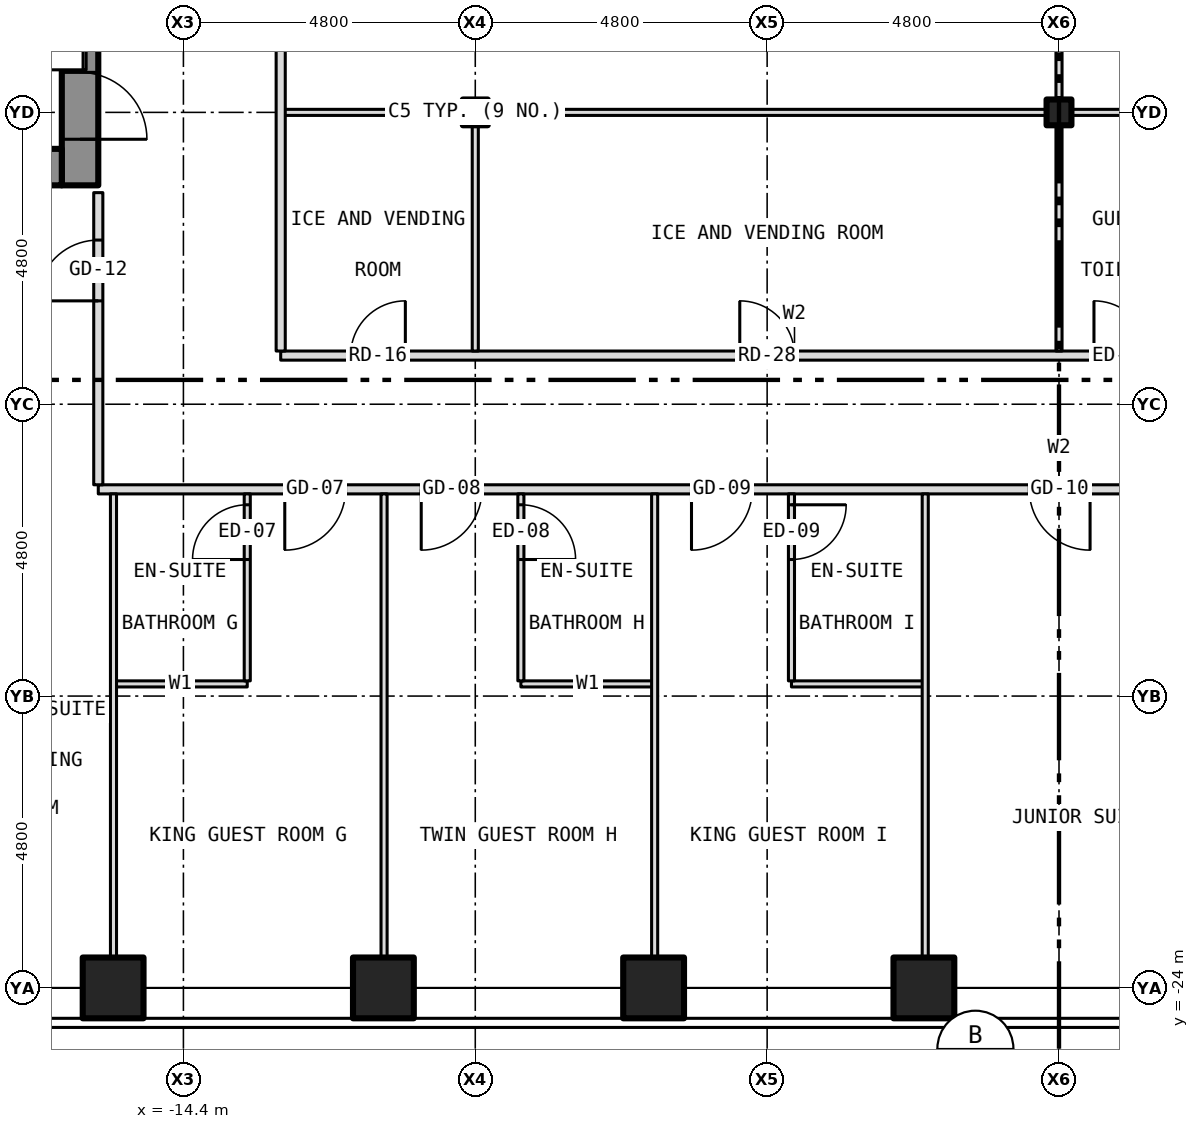
"""IFC4 building model, lengths in metres.
Left out: names, types, materials, properties, quantities, classifications, styles, units other than length and angle.
Written with IfcOpenShell. Run it as: python <this file> out.ifc"""

import sys

from ifc_helpers import new_model, si_unit, direction, frame, frame_2d, origin, origin_2d, place, context, subcontext, project, spatial, rectangle, hollow_rectangle, i_section, extrude, element, fill, save


model = new_model("IFC4")
c1 = context("Model", 3, precision=1e-05, world=origin(), true_north=direction((0.0, 1.0)))
c2 = subcontext(c1, "Body", "Model", "MODEL_VIEW")
j1 = project(units=[si_unit("LENGTHUNIT", "METRE"), si_unit("PLANEANGLEUNIT", "RADIAN")], contexts=[c1])
p1 = place(None, origin())
s1 = spatial("IfcSite", under=j1, at=p1, CompositionType="ELEMENT")
p2 = place(p1, origin())
s2 = spatial("IfcBuilding", under=s1, at=p2, CompositionType="ELEMENT")
p3 = place(p2, frame((0.0, 0.0, 49.5)))
s3 = spatial("IfcBuildingStorey", under=s2, at=p3, CompositionType="ELEMENT", Elevation=49.5)
for number, where, z_axis, x_axis in (
    (1, (-15.556, -24.0, -0.15), (0.0, 0.0, 1.0), (1.0, 0.0, 0.0)),
    (2, (-11.111, -24.0, -0.15), (0.0, 0.0, 1.0), (1.0, 0.0, 0.0)),
    (3, (-6.667, -24.0, -0.15), (0.0, 0.0, 1.0), (1.0, 0.0, 0.0)),
    (4, (-2.222, -24.0, -0.15), (0.0, 0.0, 1.0), (1.0, 0.0, 0.0)),
):
    element("IfcColumn", number, at=place(p3, frame(where, z_axis=z_axis, x_axis=x_axis)), inside=s3, PredefinedType="COLUMN", context=c2, shape_type="SweptSolid", body=[
        extrude(hollow_rectangle(XDim=1.0, YDim=1.0, WallThickness=0.06, at=origin_2d()), origin(), (0.0, 0.0, 1.0), 3.5),
    ])
for number, where, z_axis, x_axis in (
    (5, (-9.6, -9.6, -0.15), (0.0, 0.0, 1.0), (1.0, 0.0, 0.0)),
    (6, (0.0, -9.6, -0.15), (0.0, 0.0, 1.0), (1.0, 0.0, 0.0)),
):
    element("IfcColumn", number, at=place(p3, frame(where, z_axis=z_axis, x_axis=x_axis)), inside=s3, PredefinedType="COLUMN", context=c2, shape_type="SweptSolid", body=[
        extrude(i_section(OverallWidth=0.409, OverallDepth=0.424, WebThickness=0.033, FlangeThickness=0.052, at=origin_2d()), origin(), (0.0, 0.0, 1.0), 3.5),
    ])
p4 = place(p3, frame((-16.1, -10.8, 0.0), z_axis=(0.0, 0.0, 1.0), x_axis=(0.0, 1.0, 0.0)))
e7 = element("IfcWall", 7, at=p4, inside=s3, PredefinedType="SHEAR", context=c2, shape_type="SweptSolid", body=[
    extrude(rectangle(XDim=21.6, YDim=0.6, at=frame_2d((10.8, 0.0))), origin(), (0.0, 0.0, 1.0), 3.25),
])
p5 = place(p4, frame((9.4, 0.0, 0.0)))
e8 = element("IfcOpeningElement", 8, at=p5, cuts=e7, PredefinedType="OPENING", context=c2, shape_type="SweptSolid", body=[
    extrude(rectangle(XDim=1.1, YDim=2.1, at=frame_2d((0.55, 1.05))), frame((0.0, 0.312, 0.0), z_axis=(0.0, -1.0, 0.0), x_axis=(1.0, 0.0, 0.0)), (0.0, 0.0, 1.0), 0.624),
])
p6 = place(p4, frame((11.5, 0.0, 0.0)))
e9 = element("IfcOpeningElement", 9, at=p6, cuts=e7, PredefinedType="OPENING", context=c2, shape_type="SweptSolid", body=[
    extrude(rectangle(XDim=1.1, YDim=2.1, at=frame_2d((0.55, 1.05))), frame((0.0, 0.312, 0.0), z_axis=(0.0, -1.0, 0.0), x_axis=(1.0, 0.0, 0.0)), (0.0, 0.0, 1.0), 0.624),
])
p7 = place(p4, frame((13.6, 0.0, 0.0)))
e10 = element("IfcOpeningElement", 10, at=p7, cuts=e7, PredefinedType="OPENING", context=c2, shape_type="SweptSolid", body=[
    extrude(rectangle(XDim=1.1, YDim=2.1, at=frame_2d((0.55, 1.05))), frame((0.0, 0.312, 0.0), z_axis=(0.0, -1.0, 0.0), x_axis=(1.0, 0.0, 0.0)), (0.0, 0.0, 1.0), 0.624),
])
p8 = place(p4, frame((15.7, 0.0, 0.0)))
e11 = element("IfcOpeningElement", 11, at=p8, cuts=e7, PredefinedType="OPENING", context=c2, shape_type="SweptSolid", body=[
    extrude(rectangle(XDim=1.1, YDim=2.1, at=frame_2d((0.55, 1.05))), frame((0.0, 0.312, 0.0), z_axis=(0.0, -1.0, 0.0), x_axis=(1.0, 0.0, 0.0)), (0.0, 0.0, 1.0), 0.624),
])
p9 = place(p4, frame((17.8, 0.0, 0.0)))
e12 = element("IfcOpeningElement", 12, at=p9, cuts=e7, PredefinedType="OPENING", context=c2, shape_type="SweptSolid", body=[
    extrude(rectangle(XDim=1.1, YDim=2.1, at=frame_2d((0.55, 1.05))), frame((0.0, 0.312, 0.0), z_axis=(0.0, -1.0, 0.0), x_axis=(1.0, 0.0, 0.0)), (0.0, 0.0, 1.0), 0.624),
])
p10 = place(p4, frame((0.758, 0.0, 0.0)))
e13 = element("IfcOpeningElement", 13, at=p10, cuts=e7, PredefinedType="OPENING", context=c2, shape_type="SweptSolid", body=[
    extrude(rectangle(XDim=1.1, YDim=2.1, at=frame_2d((0.55, 1.05))), frame((0.0, 0.312, 0.0), z_axis=(0.0, -1.0, 0.0), x_axis=(1.0, 0.0, 0.0)), (0.0, 0.0, 1.0), 0.624),
])
p11 = place(p4, frame((7.5, 0.0, 0.0)))
e14 = element("IfcOpeningElement", 14, at=p11, cuts=e7, PredefinedType="OPENING", context=c2, shape_type="SweptSolid", body=[
    extrude(rectangle(XDim=1.1, YDim=2.1, at=frame_2d((0.55, 1.05))), frame((0.0, 0.312, 0.0), z_axis=(0.0, -1.0, 0.0), x_axis=(1.0, 0.0, 0.0)), (0.0, 0.0, 1.0), 0.624),
])
p12 = place(p3, frame((-23.4, -10.5, 0.0), z_axis=(0.0, 0.0, 1.0), x_axis=(1.0, 0.0, 0.0)))
e15 = element("IfcWall", 15, at=p12, inside=s3, PredefinedType="SHEAR", context=c2, shape_type="SweptSolid", body=[
    extrude(rectangle(XDim=7.0, YDim=0.6, at=frame_2d((3.5, 0.0))), origin(), (0.0, 0.0, 1.0), 3.25),
])
p13 = place(p3, frame((-15.55, -19.0, 0.0), z_axis=(0.0, 0.0, 1.0), x_axis=(1.0, 0.0, 0.0)))
e16 = element("IfcWall", 16, at=p13, inside=s3, PredefinedType="PARTITIONING", context=c2, shape_type="SweptSolid", body=[
    extrude(rectangle(XDim=2.2, YDim=0.1, at=frame_2d((1.1, 0.0))), origin(), (0.0, 0.0, 1.0), 3.35),
])
p14 = place(p3, frame((-8.85, -19.0, 0.0), z_axis=(0.0, 0.0, 1.0), x_axis=(1.0, 0.0, 0.0)))
e17 = element("IfcWall", 17, at=p14, inside=s3, PredefinedType="PARTITIONING", context=c2, shape_type="SweptSolid", body=[
    extrude(rectangle(XDim=2.2, YDim=0.1, at=frame_2d((1.1, 0.0))), origin(), (0.0, 0.0, 1.0), 3.35),
])
p15 = place(p3, frame((-4.4, -19.0, 0.0), z_axis=(0.0, 0.0, 1.0), x_axis=(1.0, 0.0, 0.0)))
e18 = element("IfcWall", 18, at=p15, inside=s3, PredefinedType="PARTITIONING", context=c2, shape_type="SweptSolid", body=[
    extrude(rectangle(XDim=2.2, YDim=0.1, at=frame_2d((1.1, 0.0))), origin(), (0.0, 0.0, 1.0), 3.35),
])
p16 = place(p3, frame((-15.8, -15.8, 0.0), z_axis=(0.0, 0.0, 1.0), x_axis=(1.0, 0.0, 0.0)))
e19 = element("IfcWall", 19, at=p16, inside=s3, PredefinedType="PARTITIONING", context=c2, shape_type="SweptSolid", body=[
    extrude(rectangle(XDim=31.6, YDim=0.15, at=frame_2d((15.8, 0.0))), origin(), (0.0, 0.0, 1.0), 3.35),
])
p17 = place(p16, frame((3.067, 0.0, 0.0)))
e20 = element("IfcOpeningElement", 20, at=p17, cuts=e19, PredefinedType="OPENING", context=c2, shape_type="SweptSolid", body=[
    extrude(rectangle(XDim=1.0, YDim=2.1, at=frame_2d((0.5, 1.05))), frame((0.0, 0.087, 0.0), z_axis=(0.0, -1.0, 0.0), x_axis=(1.0, 0.0, 0.0)), (0.0, 0.0, 1.0), 0.174),
])
p18 = place(p16, frame((5.311, 0.0, 0.0)))
e21 = element("IfcOpeningElement", 21, at=p18, cuts=e19, PredefinedType="OPENING", context=c2, shape_type="SweptSolid", body=[
    extrude(rectangle(XDim=1.0, YDim=2.1, at=frame_2d((0.5, 1.05))), frame((0.0, 0.087, 0.0), z_axis=(0.0, -1.0, 0.0), x_axis=(1.0, 0.0, 0.0)), (0.0, 0.0, 1.0), 0.174),
])
p19 = place(p16, frame((9.756, 0.0, 0.0)))
e22 = element("IfcOpeningElement", 22, at=p19, cuts=e19, PredefinedType="OPENING", context=c2, shape_type="SweptSolid", body=[
    extrude(rectangle(XDim=1.0, YDim=2.1, at=frame_2d((0.5, 1.05))), frame((0.0, 0.087, 0.0), z_axis=(0.0, -1.0, 0.0), x_axis=(1.0, 0.0, 0.0)), (0.0, 0.0, 1.0), 0.174),
])
p20 = place(p16, frame((15.311, 0.0, 0.0)))
e23 = element("IfcOpeningElement", 23, at=p20, cuts=e19, PredefinedType="OPENING", context=c2, shape_type="SweptSolid", body=[
    extrude(rectangle(XDim=1.0, YDim=2.1, at=frame_2d((0.5, 1.05))), frame((0.0, 0.087, 0.0), z_axis=(0.0, -1.0, 0.0), x_axis=(1.0, 0.0, 0.0)), (0.0, 0.0, 1.0), 0.174),
])
p21 = place(p16, frame((22.245, 0.0, 0.0)))
e24 = element("IfcOpeningElement", 24, at=p21, cuts=e19, PredefinedType="OPENING", context=c2, shape_type="SweptSolid", body=[
    extrude(rectangle(XDim=1.0, YDim=2.1, at=frame_2d((0.5, 1.05))), frame((0.0, 0.087, 0.0), z_axis=(0.0, -1.0, 0.0), x_axis=(1.0, 0.0, 0.0)), (0.0, 0.0, 1.0), 0.174),
])
p22 = place(p3, frame((-12.8, -13.6, 0.0), z_axis=(0.0, 0.0, 1.0), x_axis=(1.0, 0.0, 0.0)))
e25 = element("IfcWall", 25, at=p22, inside=s3, PredefinedType="PARTITIONING", context=c2, shape_type="SweptSolid", body=[
    extrude(rectangle(XDim=16.9, YDim=0.15, at=frame_2d((8.45, 0.0))), origin(), (0.0, 0.0, 1.0), 3.35),
])
p23 = place(p22, frame((1.15, 0.0, 0.0)))
e26 = element("IfcOpeningElement", 26, at=p23, cuts=e25, PredefinedType="OPENING", context=c2, shape_type="SweptSolid", body=[
    extrude(rectangle(XDim=0.9, YDim=2.1, at=frame_2d((0.45, 1.05))), frame((0.0, 0.087, 0.0), z_axis=(0.0, -1.0, 0.0), x_axis=(1.0, 0.0, 0.0)), (0.0, 0.0, 1.0), 0.174),
])
p24 = place(p22, frame((13.375, 0.0, 0.0)))
e27 = element("IfcOpeningElement", 27, at=p24, cuts=e25, PredefinedType="OPENING", context=c2, shape_type="SweptSolid", body=[
    extrude(rectangle(XDim=0.9, YDim=2.1, at=frame_2d((0.45, 1.05))), frame((0.0, 0.087, 0.0), z_axis=(0.0, -1.0, 0.0), x_axis=(1.0, 0.0, 0.0)), (0.0, 0.0, 1.0), 0.174),
])
p25 = place(p22, frame((7.55, 0.0, 0.0)))
e28 = element("IfcOpeningElement", 28, at=p25, cuts=e25, PredefinedType="OPENING", context=c2, shape_type="SweptSolid", body=[
    extrude(rectangle(XDim=0.9, YDim=2.1, at=frame_2d((0.45, 1.05))), frame((0.0, 0.087, 0.0), z_axis=(0.0, -1.0, 0.0), x_axis=(1.0, 0.0, 0.0)), (0.0, 0.0, 1.0), 0.174),
])
p26 = place(p3, frame((-12.8, -9.6, 0.0), z_axis=(0.0, 0.0, 1.0), x_axis=(1.0, 0.0, 0.0)))
e29 = element("IfcWall", 29, at=p26, inside=s3, PredefinedType="PARTITIONING", context=c2, shape_type="SweptSolid", body=[
    extrude(rectangle(XDim=2.996, YDim=0.1, at=frame_2d((1.498, 0.0))), origin(), (0.0, 0.0, 1.0), 2.728),
])
p27 = place(p3, frame((-9.804, -9.6, 0.0), z_axis=(0.0, 0.0, 1.0), x_axis=(1.0, 0.0, 0.0)))
e30 = element("IfcWall", 30, at=p27, inside=s3, PredefinedType="PARTITIONING", context=c2, shape_type="SweptSolid", body=[
    extrude(rectangle(XDim=0.408, YDim=0.1, at=frame_2d((0.204, 0.0))), origin(), (0.0, 0.0, 1.0), 3.35),
])
p28 = place(p3, frame((-9.396, -9.6, 0.0), z_axis=(0.0, 0.0, 1.0), x_axis=(1.0, 0.0, 0.0)))
e31 = element("IfcWall", 31, at=p28, inside=s3, PredefinedType="PARTITIONING", context=c2, shape_type="SweptSolid", body=[
    extrude(rectangle(XDim=9.192, YDim=0.1, at=frame_2d((4.596, 0.0))), origin(), (0.0, 0.0, 1.0), 2.728),
])
p29 = place(p3, frame((-0.204, -9.6, 0.0), z_axis=(0.0, 0.0, 1.0), x_axis=(1.0, 0.0, 0.0)))
e32 = element("IfcWall", 32, at=p29, inside=s3, PredefinedType="PARTITIONING", context=c2, shape_type="SweptSolid", body=[
    extrude(rectangle(XDim=0.408, YDim=0.1, at=frame_2d((0.204, 0.0))), origin(), (0.0, 0.0, 1.0), 3.35),
])
p30 = place(p3, frame((0.204, -9.6, 0.0), z_axis=(0.0, 0.0, 1.0), x_axis=(1.0, 0.0, 0.0)))
e33 = element("IfcWall", 33, at=p30, inside=s3, PredefinedType="PARTITIONING", context=c2, shape_type="SweptSolid", body=[
    extrude(rectangle(XDim=3.896, YDim=0.1, at=frame_2d((1.948, 0.0))), origin(), (0.0, 0.0, 1.0), 2.728),
])
p31 = place(p3, frame((-15.8, -15.725, 0.0), z_axis=(0.0, 0.0, 1.0), x_axis=(0.0, 1.0, 0.0)))
e34 = element("IfcWall", 34, at=p31, inside=s3, PredefinedType="PARTITIONING", context=c2, shape_type="SweptSolid", body=[
    extrude(rectangle(XDim=4.805, YDim=0.15, at=frame_2d((2.403, 0.0))), origin(), (0.0, 0.0, 1.0), 3.35),
])
p32 = place(p31, frame((3.025, 0.0, 0.0)))
e35 = element("IfcOpeningElement", 35, at=p32, cuts=e34, PredefinedType="OPENING", context=c2, shape_type="SweptSolid", body=[
    extrude(rectangle(XDim=1.0, YDim=2.1, at=frame_2d((0.5, 1.05))), frame((0.0, 0.087, 0.0), z_axis=(0.0, -1.0, 0.0), x_axis=(1.0, 0.0, 0.0)), (0.0, 0.0, 1.0), 0.174),
])
p33 = place(p3, frame((-15.55, -23.88, 0.0), z_axis=(0.0, 0.0, 1.0), x_axis=(0.0, 1.0, 0.0)))
e36 = element("IfcWall", 36, at=p33, inside=s3, PredefinedType="PARTITIONING", context=c2, shape_type="SweptSolid", body=[
    extrude(rectangle(XDim=8.005, YDim=0.1, at=frame_2d((4.002, 0.0))), origin(), (0.0, 0.0, 1.0), 3.35),
])
p34 = place(p3, frame((-13.35, -18.95, 0.0), z_axis=(0.0, 0.0, 1.0), x_axis=(0.0, 1.0, 0.0)))
e37 = element("IfcWall", 37, at=p34, inside=s3, PredefinedType="PARTITIONING", context=c2, shape_type="SweptSolid", body=[
    extrude(rectangle(XDim=3.075, YDim=0.1, at=frame_2d((1.538, 0.0))), origin(), (0.0, 0.0, 1.0), 3.35),
])
p35 = place(p34, frame((1.996, 0.0, 0.0)))
e38 = element("IfcOpeningElement", 38, at=p35, cuts=e37, PredefinedType="OPENING", context=c2, shape_type="SweptSolid", body=[
    extrude(rectangle(XDim=0.9, YDim=2.1, at=frame_2d((0.45, 1.05))), frame((0.0, 0.062, 0.0), z_axis=(0.0, -1.0, 0.0), x_axis=(1.0, 0.0, 0.0)), (0.0, 0.0, 1.0), 0.124),
])
p36 = place(p3, frame((-12.8, -13.525, 0.0), z_axis=(0.0, 0.0, 1.0), x_axis=(0.0, 1.0, 0.0)))
e39 = element("IfcWall", 39, at=p36, inside=s3, PredefinedType="PARTITIONING", context=c2, shape_type="SweptSolid", body=[
    extrude(rectangle(XDim=11.525, YDim=0.15, at=frame_2d((5.762, 0.0))), origin(), (0.0, 0.0, 1.0), 3.35),
])
p37 = place(p36, frame((7.325, 0.0, 0.0)))
e40 = element("IfcOpeningElement", 40, at=p37, cuts=e39, PredefinedType="OPENING", context=c2, shape_type="SweptSolid", body=[
    extrude(rectangle(XDim=0.9, YDim=2.1, at=frame_2d((0.45, 1.05))), frame((0.0, 0.087, 0.0), z_axis=(0.0, -1.0, 0.0), x_axis=(1.0, 0.0, 0.0)), (0.0, 0.0, 1.0), 0.174),
])
p38 = place(p3, frame((-11.1, -23.88, 0.0), z_axis=(0.0, 0.0, 1.0), x_axis=(0.0, 1.0, 0.0)))
e41 = element("IfcWall", 41, at=p38, inside=s3, PredefinedType="PARTITIONING", context=c2, shape_type="SweptSolid", body=[
    extrude(rectangle(XDim=8.005, YDim=0.1, at=frame_2d((4.002, 0.0))), origin(), (0.0, 0.0, 1.0), 3.35),
])
p39 = place(p3, frame((-9.6, -13.525, 0.0), z_axis=(0.0, 0.0, 1.0), x_axis=(0.0, 1.0, 0.0)))
e42 = element("IfcWall", 42, at=p39, inside=s3, PredefinedType="PARTITIONING", context=c2, shape_type="SweptSolid", body=[
    extrude(rectangle(XDim=3.875, YDim=0.1, at=frame_2d((1.938, 0.0))), origin(), (0.0, 0.0, 1.0), 2.728),
])
p40 = place(p3, frame((-8.85, -18.95, 0.0), z_axis=(0.0, 0.0, 1.0), x_axis=(0.0, 1.0, 0.0)))
e43 = element("IfcWall", 43, at=p40, inside=s3, PredefinedType="PARTITIONING", context=c2, shape_type="SweptSolid", body=[
    extrude(rectangle(XDim=3.075, YDim=0.1, at=frame_2d((1.538, 0.0))), origin(), (0.0, 0.0, 1.0), 3.35),
])
p41 = place(p40, frame((1.996, 0.0, 0.0)))
e44 = element("IfcOpeningElement", 44, at=p41, cuts=e43, PredefinedType="OPENING", context=c2, shape_type="SweptSolid", body=[
    extrude(rectangle(XDim=0.9, YDim=2.1, at=frame_2d((0.45, 1.05))), frame((0.0, 0.062, 0.0), z_axis=(0.0, -1.0, 0.0), x_axis=(1.0, 0.0, 0.0)), (0.0, 0.0, 1.0), 0.124),
])
p42 = place(p3, frame((-6.65, -23.88, 0.0), z_axis=(0.0, 0.0, 1.0), x_axis=(0.0, 1.0, 0.0)))
e45 = element("IfcWall", 45, at=p42, inside=s3, PredefinedType="PARTITIONING", context=c2, shape_type="SweptSolid", body=[
    extrude(rectangle(XDim=8.005, YDim=0.1, at=frame_2d((4.002, 0.0))), origin(), (0.0, 0.0, 1.0), 3.35),
])
p43 = place(p3, frame((-4.4, -18.95, 0.0), z_axis=(0.0, 0.0, 1.0), x_axis=(0.0, 1.0, 0.0)))
e46 = element("IfcWall", 46, at=p43, inside=s3, PredefinedType="PARTITIONING", context=c2, shape_type="SweptSolid", body=[
    extrude(rectangle(XDim=3.075, YDim=0.1, at=frame_2d((1.538, 0.0))), origin(), (0.0, 0.0, 1.0), 3.35),
])
p44 = place(p43, frame((1.996, 0.0, 0.0)))
e47 = element("IfcOpeningElement", 47, at=p44, cuts=e46, PredefinedType="OPENING", context=c2, shape_type="SweptSolid", body=[
    extrude(rectangle(XDim=0.9, YDim=2.1, at=frame_2d((0.45, 1.05))), frame((0.0, 0.062, 0.0), z_axis=(0.0, -1.0, 0.0), x_axis=(1.0, 0.0, 0.0)), (0.0, 0.0, 1.0), 0.124),
])
p45 = place(p3, frame((-2.2, -23.88, 0.0), z_axis=(0.0, 0.0, 1.0), x_axis=(0.0, 1.0, 0.0)))
e48 = element("IfcWall", 48, at=p45, inside=s3, PredefinedType="PARTITIONING", context=c2, shape_type="SweptSolid", body=[
    extrude(rectangle(XDim=8.005, YDim=0.1, at=frame_2d((4.002, 0.0))), origin(), (0.0, 0.0, 1.0), 3.35),
])
p46 = place(p3, frame((0.0, -13.525, 0.0), z_axis=(0.0, 0.0, 1.0), x_axis=(0.0, 1.0, 0.0)))
e49 = element("IfcWall", 49, at=p46, inside=s3, PredefinedType="PARTITIONING", context=c2, shape_type="SweptSolid", body=[
    extrude(rectangle(XDim=3.875, YDim=0.1, at=frame_2d((1.938, 0.0))), origin(), (0.0, 0.0, 1.0), 2.728),
])
p47 = place(p3, frame((0.0, -9.55, 0.0), z_axis=(0.0, 0.0, 1.0), x_axis=(0.0, 1.0, 0.0)))
e50 = element("IfcWall", 50, at=p47, inside=s3, PredefinedType="PARTITIONING", context=c2, shape_type="SweptSolid", body=[
    extrude(rectangle(XDim=9.5, YDim=0.1, at=frame_2d((4.75, 0.0))), origin(), (0.0, 0.0, 1.0), 2.728),
])
p48 = place(p10, origin())
e51 = element("IfcDoor", 51, at=p48, inside=s3, OperationType="SINGLE_SWING_LEFT", PredefinedType="DOOR", context=c2, shape_type="SweptSolid", body=[
    extrude(rectangle(XDim=1.1, YDim=2.1, at=frame_2d((0.55, 1.05))), frame((0.0, 0.025, 0.0), z_axis=(0.0, -1.0, 0.0), x_axis=(1.0, 0.0, 0.0)), (0.0, 0.0, 1.0), 0.05),
])
fill(e13, e51)
p49 = place(p17, origin())
e52 = element("IfcDoor", 52, at=p49, inside=s3, OperationType="SINGLE_SWING_LEFT", PredefinedType="DOOR", context=c2, shape_type="SweptSolid", body=[
    extrude(rectangle(XDim=1.0, YDim=2.1, at=frame_2d((0.5, 1.05))), frame((0.0, 0.025, 0.0), z_axis=(0.0, -1.0, 0.0), x_axis=(1.0, 0.0, 0.0)), (0.0, 0.0, 1.0), 0.05),
])
fill(e20, e52)
p50 = place(p35, origin())
e53 = element("IfcDoor", 53, at=p50, inside=s3, OperationType="SINGLE_SWING_LEFT", PredefinedType="DOOR", context=c2, shape_type="SweptSolid", body=[
    extrude(rectangle(XDim=0.9, YDim=2.1, at=frame_2d((0.45, 1.05))), frame((0.0, 0.025, 0.0), z_axis=(0.0, -1.0, 0.0), x_axis=(1.0, 0.0, 0.0)), (0.0, 0.0, 1.0), 0.05),
])
fill(e38, e53)
p51 = place(p18, origin())
e54 = element("IfcDoor", 54, at=p51, inside=s3, OperationType="SINGLE_SWING_LEFT", PredefinedType="DOOR", context=c2, shape_type="SweptSolid", body=[
    extrude(rectangle(XDim=1.0, YDim=2.1, at=frame_2d((0.5, 1.05))), frame((0.0, 0.025, 0.0), z_axis=(0.0, -1.0, 0.0), x_axis=(1.0, 0.0, 0.0)), (0.0, 0.0, 1.0), 0.05),
])
fill(e21, e54)
p52 = place(p41, origin())
e55 = element("IfcDoor", 55, at=p52, inside=s3, OperationType="SINGLE_SWING_LEFT", PredefinedType="DOOR", context=c2, shape_type="SweptSolid", body=[
    extrude(rectangle(XDim=0.9, YDim=2.1, at=frame_2d((0.45, 1.05))), frame((0.0, 0.025, 0.0), z_axis=(0.0, -1.0, 0.0), x_axis=(1.0, 0.0, 0.0)), (0.0, 0.0, 1.0), 0.05),
])
fill(e44, e55)
p53 = place(p19, origin())
e56 = element("IfcDoor", 56, at=p53, inside=s3, OperationType="SINGLE_SWING_LEFT", PredefinedType="DOOR", context=c2, shape_type="SweptSolid", body=[
    extrude(rectangle(XDim=1.0, YDim=2.1, at=frame_2d((0.5, 1.05))), frame((0.0, 0.025, 0.0), z_axis=(0.0, -1.0, 0.0), x_axis=(1.0, 0.0, 0.0)), (0.0, 0.0, 1.0), 0.05),
])
fill(e22, e56)
p54 = place(p44, origin())
e57 = element("IfcDoor", 57, at=p54, inside=s3, OperationType="SINGLE_SWING_RIGHT", PredefinedType="DOOR", context=c2, shape_type="SweptSolid", body=[
    extrude(rectangle(XDim=0.9, YDim=2.1, at=frame_2d((0.45, 1.05))), frame((0.0, 0.025, 0.0), z_axis=(0.0, -1.0, 0.0), x_axis=(1.0, 0.0, 0.0)), (0.0, 0.0, 1.0), 0.05),
])
fill(e47, e57)
p55 = place(p20, origin())
e58 = element("IfcDoor", 58, at=p55, inside=s3, OperationType="SINGLE_SWING_RIGHT", PredefinedType="DOOR", context=c2, shape_type="SweptSolid", body=[
    extrude(rectangle(XDim=1.0, YDim=2.1, at=frame_2d((0.5, 1.05))), frame((0.0, 0.025, 0.0), z_axis=(0.0, -1.0, 0.0), x_axis=(1.0, 0.0, 0.0)), (0.0, 0.0, 1.0), 0.05),
])
fill(e23, e58)
p56 = place(p32, origin())
e59 = element("IfcDoor", 59, at=p56, inside=s3, OperationType="SINGLE_SWING_LEFT", PredefinedType="DOOR", context=c2, shape_type="SweptSolid", body=[
    extrude(rectangle(XDim=1.0, YDim=2.1, at=frame_2d((0.5, 1.05))), frame((0.0, 0.025, 0.0), z_axis=(0.0, -1.0, 0.0), x_axis=(1.0, 0.0, 0.0)), (0.0, 0.0, 1.0), 0.05),
])
fill(e35, e59)
p57 = place(p23, origin())
e60 = element("IfcDoor", 60, at=p57, inside=s3, OperationType="SINGLE_SWING_RIGHT", PredefinedType="DOOR", context=c2, shape_type="SweptSolid", body=[
    extrude(rectangle(XDim=0.9, YDim=2.1, at=frame_2d((0.45, 1.05))), frame((0.0, 0.025, 0.0), z_axis=(0.0, -1.0, 0.0), x_axis=(1.0, 0.0, 0.0)), (0.0, 0.0, 1.0), 0.05),
])
fill(e26, e60)
p58 = place(p24, origin())
e61 = element("IfcDoor", 61, at=p58, inside=s3, OperationType="SINGLE_SWING_LEFT", PredefinedType="DOOR", context=c2, shape_type="SweptSolid", body=[
    extrude(rectangle(XDim=0.9, YDim=2.1, at=frame_2d((0.45, 1.05))), frame((0.0, 0.025, 0.0), z_axis=(0.0, -1.0, 0.0), x_axis=(1.0, 0.0, 0.0)), (0.0, 0.0, 1.0), 0.05),
])
fill(e27, e61)
p59 = place(p25, origin())
e62 = element("IfcDoor", 62, at=p59, inside=s3, OperationType="SINGLE_SWING_LEFT", PredefinedType="DOOR", context=c2, shape_type="SweptSolid", body=[
    extrude(rectangle(XDim=0.9, YDim=2.1, at=frame_2d((0.45, 1.05))), frame((0.0, 0.025, 0.0), z_axis=(0.0, -1.0, 0.0), x_axis=(1.0, 0.0, 0.0)), (0.0, 0.0, 1.0), 0.05),
])
fill(e28, e62)
save(model, sys.argv[1])
